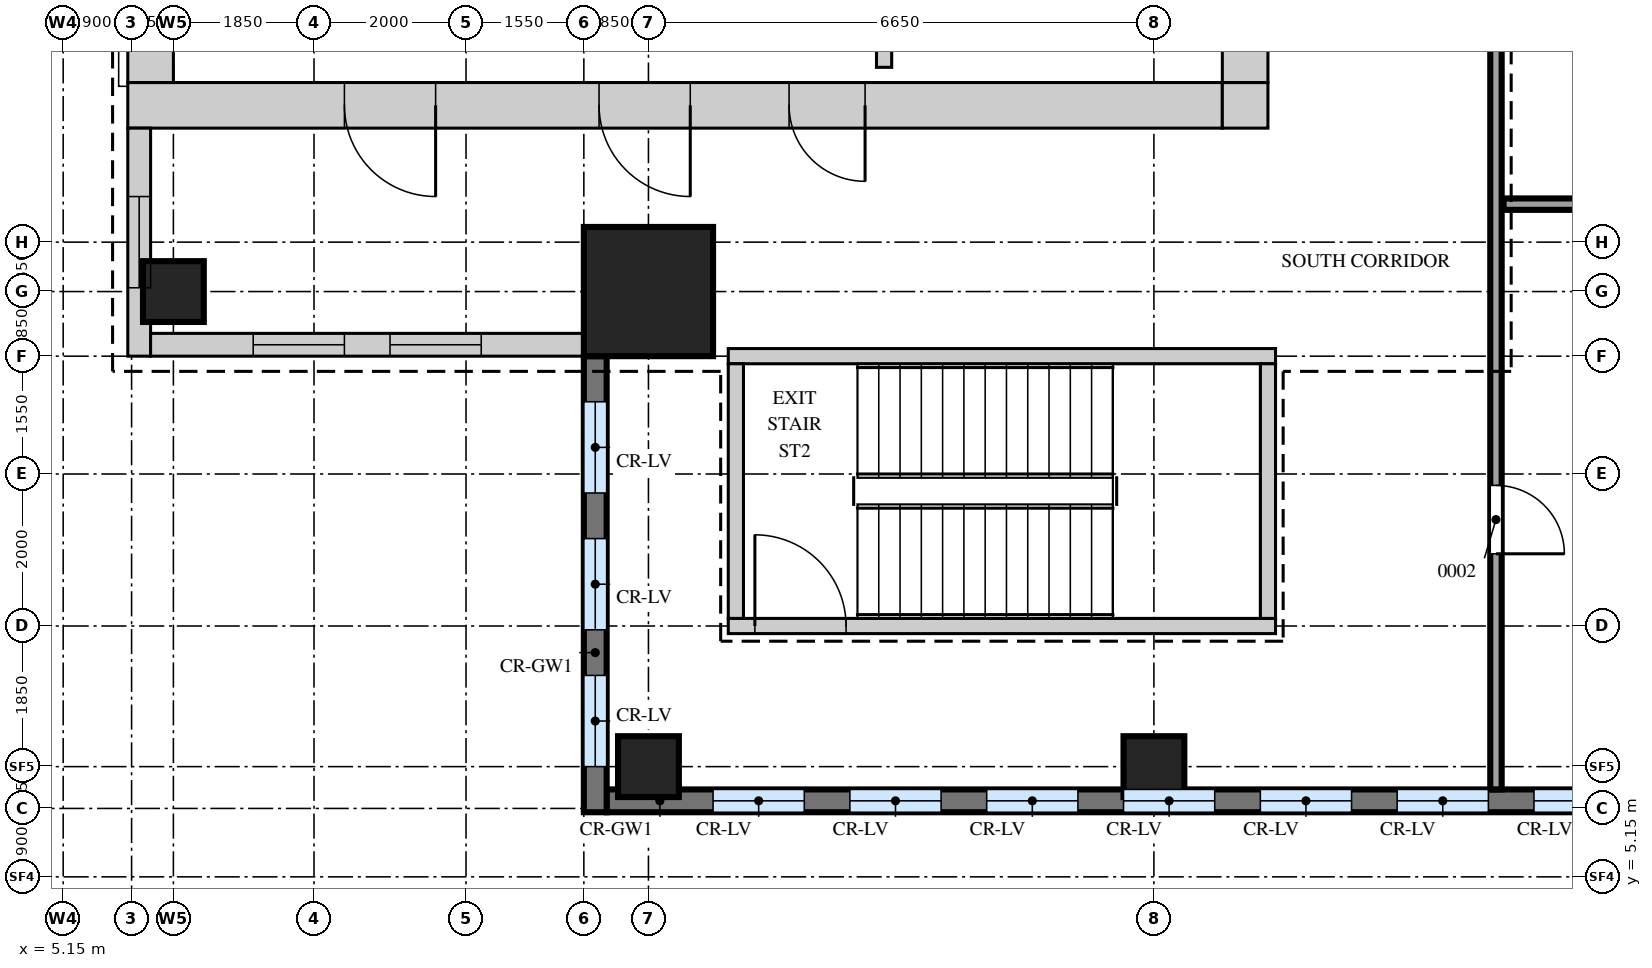
"""IFC4 building model, lengths in metres.
Left out: names, types, materials, properties, quantities, classifications, styles, units other than length and angle.
Written with IfcOpenShell. Run it as: python <this file> out.ifc"""

import sys

from ifc_helpers import new_model, si_unit, direction, frame, frame_2d, origin, origin_2d, place, context, subcontext, project, spatial, rectangle, extrude, source, transform, mapped, element, fill, save


model = new_model("IFC4")
c1 = context("Model", 3, precision=1e-05, world=origin(), true_north=direction((0.0, 1.0)))
c2 = subcontext(c1, "Body", "Model", "MODEL_VIEW")
j1 = project(units=[si_unit("LENGTHUNIT", "METRE"), si_unit("PLANEANGLEUNIT", "RADIAN")], contexts=[c1])
p1 = place(None, origin())
s1 = spatial("IfcSite", under=j1, at=p1, CompositionType="ELEMENT")
p2 = place(p1, origin())
s2 = spatial("IfcBuilding", under=s1, at=p2, CompositionType="ELEMENT")
p3 = place(p2, frame((0.0, 0.0, 339.2)))
s3 = spatial("IfcBuildingStorey", under=s2, at=p3, CompositionType="ELEMENT", Elevation=339.2)
m1 = source(origin(), c2, "Body", "SweptSolid", [
    extrude(rectangle(XDim=14.4, YDim=0.6, at=frame_2d((7.2, 0.0))), origin(), (0.0, 0.0, 1.0), 4.25),
])
p4 = place(p3, frame((6.0, 15.3, 0.0), z_axis=(0.0, 0.0, 1.0), x_axis=(1.0, 0.0, 0.0)))
e1 = element("IfcWall", 1, at=p4, inside=s3, PredefinedType="SHEAR", context=c2, shape_type="MappedRepresentation", body=[
    mapped(m1, transform((0.0, 0.0, 0.0))),
])
m2 = source(origin(), c2, "Body", "SweptSolid", [
    extrude(rectangle(XDim=1.2, YDim=2.1, at=frame_2d((0.6, 1.05))), frame((0.0, 0.31, 0.0), z_axis=(0.0, -1.0, 0.0), x_axis=(1.0, 0.0, 0.0)), (0.0, 0.0, 1.0), 0.62),
])
p5 = place(p4, frame((6.2, 0.0, 0.0)))
e2 = element("IfcOpeningElement", 2, at=p5, cuts=e1, PredefinedType="OPENING", context=c2, shape_type="MappedRepresentation", body=[
    mapped(m2, transform((0.0, 0.0, 0.0))),
])
p6 = place(p4, frame((2.85, 0.0, 0.0)))
e3 = element("IfcOpeningElement", 3, at=p6, cuts=e1, PredefinedType="OPENING", context=c2, shape_type="MappedRepresentation", body=[
    mapped(m2, transform((0.0, 0.0, 0.0))),
])
m3 = source(origin(), c2, "Body", "SweptSolid", [
    extrude(rectangle(XDim=1.0, YDim=2.1, at=frame_2d((0.5, 1.05))), frame((0.0, 0.31, 0.0), z_axis=(0.0, -1.0, 0.0), x_axis=(1.0, 0.0, 0.0)), (0.0, 0.0, 1.0), 0.62),
])
p7 = place(p4, frame((8.7, 0.0, 0.0)))
e4 = element("IfcOpeningElement", 4, at=p7, cuts=e1, PredefinedType="OPENING", context=c2, shape_type="MappedRepresentation", body=[
    mapped(m3, transform((0.0, 0.0, 0.0))),
])
m4 = source(origin(), c2, "Body", "SweptSolid", [
    extrude(rectangle(XDim=0.6, YDim=0.6, at=frame_2d((0.3, 0.0))), origin(), (0.0, 0.0, 1.0), 4.25),
])
p8 = place(p3, frame((20.4, 15.3, 0.0), z_axis=(0.0, 0.0, 1.0), x_axis=(1.0, 0.0, 0.0)))
e5 = element("IfcWall", 5, at=p8, inside=s3, PredefinedType="SHEAR", context=c2, shape_type="MappedRepresentation", body=[
    mapped(m4, transform((0.0, 0.0, 0.0))),
])
m5 = source(origin(), c2, "Body", "SweptSolid", [
    extrude(rectangle(XDim=22.8, YDim=0.6, at=frame_2d((11.4, 0.0))), origin(), (0.0, 0.0, 1.0), 4.25),
])
p9 = place(p3, frame((20.7, 15.6, 0.0), z_axis=(0.0, 0.0, 1.0), x_axis=(0.0, 1.0, 0.0)))
e6 = element("IfcWall", 6, at=p9, inside=s3, PredefinedType="SHEAR", context=c2, shape_type="MappedRepresentation", body=[
    mapped(m5, transform((0.0, 0.0, 0.0))),
])
m6 = source(origin(), c2, "Body", "SweptSolid", [
    extrude(rectangle(XDim=0.9, YDim=2.1, at=frame_2d((0.45, 1.05))), frame((0.0, 0.31, 0.0), z_axis=(0.0, -1.0, 0.0), x_axis=(1.0, 0.0, 0.0)), (0.0, 0.0, 1.0), 0.62),
])
p10 = place(p9, frame((8.2, 0.0, 0.0)))
e7 = element("IfcOpeningElement", 7, at=p10, cuts=e6, PredefinedType="OPENING", context=c2, shape_type="MappedRepresentation", body=[
    mapped(m6, transform((0.0, 0.0, 0.0))),
])
p11 = place(p9, frame((11.35, 0.0, 0.0)))
e8 = element("IfcOpeningElement", 8, at=p11, cuts=e6, PredefinedType="OPENING", context=c2, shape_type="MappedRepresentation", body=[
    mapped(m6, transform((0.0, 0.0, 0.0))),
])
p12 = place(p9, frame((14.65, 0.0, 0.0)))
e9 = element("IfcOpeningElement", 9, at=p12, cuts=e6, PredefinedType="OPENING", context=c2, shape_type="MappedRepresentation", body=[
    mapped(m6, transform((0.0, 0.0, 0.0))),
])
p13 = place(p9, frame((1.55, 0.0, 0.0)))
e10 = element("IfcOpeningElement", 10, at=p13, cuts=e6, PredefinedType="OPENING", context=c2, shape_type="MappedRepresentation", body=[
    mapped(m6, transform((0.0, 0.0, 0.0))),
])
p14 = place(p9, frame((5.1, 0.0, 0.0)))
e11 = element("IfcOpeningElement", 11, at=p14, cuts=e6, PredefinedType="OPENING", context=c2, shape_type="MappedRepresentation", body=[
    mapped(m6, transform((0.0, 0.0, 0.0))),
])
p15 = place(p3, frame((6.3, 15.6, 0.0), z_axis=(0.0, 0.0, 1.0), x_axis=(0.0, 1.0, 0.0)))
e12 = element("IfcWall", 12, at=p15, inside=s3, PredefinedType="SHEAR", context=c2, shape_type="MappedRepresentation", body=[
    mapped(m5, transform((0.0, 0.0, 0.0))),
])
m7 = source(origin(), c2, "Body", "SweptSolid", [
    extrude(rectangle(XDim=7.2, YDim=0.2, at=frame_2d((3.6, 0.0))), origin(), (0.0, 0.0, 1.0), 4.25),
])
p16 = place(p3, frame((13.9, 12.0, 0.0), z_axis=(0.0, 0.0, 1.0), x_axis=(1.0, 0.0, 0.0)))
e13 = element("IfcWall", 13, at=p16, inside=s3, PredefinedType="SHEAR", context=c2, shape_type="MappedRepresentation", body=[
    mapped(m7, transform((0.0, 0.0, 0.0))),
])
p17 = place(p3, frame((13.9, 8.45, 0.0), z_axis=(0.0, 0.0, 1.0), x_axis=(1.0, 0.0, 0.0)))
e14 = element("IfcWall", 14, at=p17, inside=s3, PredefinedType="SHEAR", context=c2, shape_type="MappedRepresentation", body=[
    mapped(m7, transform((0.0, 0.0, 0.0))),
])
m8 = source(origin(), c2, "Body", "SweptSolid", [
    extrude(rectangle(XDim=1.2, YDim=2.1, at=frame_2d((0.6, 1.05))), frame((0.0, 0.11, 0.0), z_axis=(0.0, -1.0, 0.0), x_axis=(1.0, 0.0, 0.0)), (0.0, 0.0, 1.0), 0.22),
])
p18 = place(p17, frame((0.35, 0.0, 0.0)))
e15 = element("IfcOpeningElement", 15, at=p18, cuts=e14, PredefinedType="OPENING", context=c2, shape_type="MappedRepresentation", body=[
    mapped(m8, transform((0.0, 0.0, 0.0))),
])
m9 = source(origin(), c2, "Body", "SweptSolid", [
    extrude(rectangle(XDim=3.35, YDim=0.2, at=frame_2d((1.675, 0.0))), origin(), (0.0, 0.0, 1.0), 4.25),
])
for number, where, z_axis, x_axis in (
    (16, (21.0, 8.55, 0.0), (0.0, 0.0, 1.0), (0.0, 1.0, 0.0)),
    (17, (14.0, 8.55, 0.0), (0.0, 0.0, 1.0), (0.0, 1.0, 0.0)),
):
    element("IfcWall", number, at=place(p3, frame(where, z_axis=z_axis, x_axis=x_axis)), inside=s3, PredefinedType="SHEAR", context=c2, shape_type="MappedRepresentation", body=[
        mapped(m9, transform((0.0, 0.0, 0.0))),
    ])
m10 = source(origin(), c2, "Body", "SweptSolid", [
    extrude(rectangle(XDim=1.7, YDim=1.7, at=origin_2d()), origin(), (0.0, 0.0, 1.0), 4.5),
])
p19 = place(p3, frame((12.85, 12.85, 0.0), z_axis=(0.0, 0.0, 1.0), x_axis=(1.0, 0.0, 0.0)))
e18 = element("IfcColumn", 18, at=p19, inside=s3, PredefinedType="COLUMN", context=c2, shape_type="MappedRepresentation", body=[
    mapped(m10, transform((0.0, 0.0, 0.0))),
])
m11 = source(origin(), c2, "Body", "SweptSolid", [
    extrude(rectangle(XDim=0.8, YDim=0.8, at=origin_2d()), origin(), (0.0, 0.0, 1.0), 4.5),
])
for number, where, z_axis, x_axis in (
    (19, (12.85, 6.6, 0.0), (0.0, 0.0, 1.0), (1.0, 0.0, 0.0)),
    (20, (19.5, 6.6, 0.0), (0.0, 0.0, 1.0), (1.0, 0.0, 0.0)),
    (21, (6.6, 12.85, 0.0), (0.0, 0.0, 1.0), (1.0, 0.0, 0.0)),
):
    element("IfcColumn", number, at=place(p3, frame(where, z_axis=z_axis, x_axis=x_axis)), inside=s3, PredefinedType="COLUMN", context=c2, shape_type="MappedRepresentation", body=[
        mapped(m11, transform((0.0, 0.0, 0.0))),
    ])
m12 = source(origin(), c2, "Body", "SweptSolid", [
    extrude(rectangle(XDim=18.362, YDim=0.3, at=frame_2d((9.181, 0.0))), origin(), (0.0, 0.0, 1.0), 4.5),
])
p20 = place(p3, frame((12.3, 6.15, 0.0), z_axis=(0.0, 0.0, 1.0), x_axis=(1.0, 0.0, 0.0)))
e22 = element("IfcWall", 22, at=p20, inside=s3, PredefinedType="SOLIDWALL", context=c2, shape_type="MappedRepresentation", body=[
    mapped(m12, transform((0.0, 0.0, 0.0))),
])
m13 = source(origin(), c2, "Body", "SweptSolid", [
    extrude(rectangle(XDim=1.2, YDim=2.4, at=frame_2d((0.6, 1.2))), frame((0.0, 0.16, 0.0), z_axis=(0.0, -1.0, 0.0), x_axis=(1.0, 0.0, 0.0)), (0.0, 0.0, 1.0), 0.32),
])
p21 = place(p20, frame((1.4, 0.0, 0.9)))
e23 = element("IfcOpeningElement", 23, at=p21, cuts=e22, PredefinedType="OPENING", context=c2, shape_type="MappedRepresentation", body=[
    mapped(m13, transform((0.0, 0.0, 0.0))),
])
p22 = place(p20, frame((3.2, 0.0, 0.9)))
e24 = element("IfcOpeningElement", 24, at=p22, cuts=e22, PredefinedType="OPENING", context=c2, shape_type="MappedRepresentation", body=[
    mapped(m13, transform((0.0, 0.0, 0.0))),
])
p23 = place(p20, frame((5.0, 0.0, 0.9)))
e25 = element("IfcOpeningElement", 25, at=p23, cuts=e22, PredefinedType="OPENING", context=c2, shape_type="MappedRepresentation", body=[
    mapped(m13, transform((0.0, 0.0, 0.0))),
])
p24 = place(p20, frame((6.8, 0.0, 0.9)))
e26 = element("IfcOpeningElement", 26, at=p24, cuts=e22, PredefinedType="OPENING", context=c2, shape_type="MappedRepresentation", body=[
    mapped(m13, transform((0.0, 0.0, 0.0))),
])
p25 = place(p20, frame((8.6, 0.0, 0.9)))
e27 = element("IfcOpeningElement", 27, at=p25, cuts=e22, PredefinedType="OPENING", context=c2, shape_type="MappedRepresentation", body=[
    mapped(m13, transform((0.0, 0.0, 0.0))),
])
p26 = place(p20, frame((10.4, 0.0, 0.9)))
e28 = element("IfcOpeningElement", 28, at=p26, cuts=e22, PredefinedType="OPENING", context=c2, shape_type="MappedRepresentation", body=[
    mapped(m13, transform((0.0, 0.0, 0.0))),
])
p27 = place(p20, frame((12.2, 0.0, 0.9)))
e29 = element("IfcOpeningElement", 29, at=p27, cuts=e22, PredefinedType="OPENING", context=c2, shape_type="MappedRepresentation", body=[
    mapped(m13, transform((0.0, 0.0, 0.0))),
])
p28 = place(p20, frame((14.0, 0.0, 0.9)))
e30 = element("IfcOpeningElement", 30, at=p28, cuts=e22, PredefinedType="OPENING", context=c2, shape_type="MappedRepresentation", body=[
    mapped(m13, transform((0.0, 0.0, 0.0))),
])
p29 = place(p20, frame((15.8, 0.0, 0.9)))
e31 = element("IfcOpeningElement", 31, at=p29, cuts=e22, PredefinedType="OPENING", context=c2, shape_type="MappedRepresentation", body=[
    mapped(m13, transform((0.0, 0.0, 0.0))),
])
m14 = source(origin(), c2, "Body", "SweptSolid", [
    extrude(rectangle(XDim=3.0, YDim=0.3, at=frame_2d((1.5, 0.0))), origin(), (0.0, 0.0, 1.0), 4.5),
])
p30 = place(p3, frame((6.15, 15.0, 0.0), z_axis=(0.0, 0.0, 1.0), x_axis=(0.0, -1.0, 0.0)))
e32 = element("IfcWall", 32, at=p30, inside=s3, PredefinedType="SOLIDWALL", context=c2, shape_type="MappedRepresentation", body=[
    mapped(m14, transform((0.0, 0.0, 0.0))),
])
p31 = place(p30, frame((0.9, 0.0, 0.9)))
e33 = element("IfcOpeningElement", 33, at=p31, cuts=e32, PredefinedType="OPENING", context=c2, shape_type="MappedRepresentation", body=[
    mapped(m13, transform((0.0, 0.0, 0.0))),
])
m15 = source(origin(), c2, "Body", "SweptSolid", [
    extrude(rectangle(XDim=5.7, YDim=0.3, at=frame_2d((2.85, 0.0))), origin(), (0.0, 0.0, 1.0), 4.5),
])
p32 = place(p3, frame((6.3, 12.15, 0.0), z_axis=(0.0, 0.0, 1.0), x_axis=(1.0, 0.0, 0.0)))
e34 = element("IfcWall", 34, at=p32, inside=s3, PredefinedType="SOLIDWALL", context=c2, shape_type="MappedRepresentation", body=[
    mapped(m15, transform((0.0, 0.0, 0.0))),
])
p33 = place(p32, frame((1.35, 0.0, 0.9)))
e35 = element("IfcOpeningElement", 35, at=p33, cuts=e34, PredefinedType="OPENING", context=c2, shape_type="MappedRepresentation", body=[
    mapped(m13, transform((0.0, 0.0, 0.0))),
])
p34 = place(p32, frame((3.15, 0.0, 0.9)))
e36 = element("IfcOpeningElement", 36, at=p34, cuts=e34, PredefinedType="OPENING", context=c2, shape_type="MappedRepresentation", body=[
    mapped(m13, transform((0.0, 0.0, 0.0))),
])
m16 = source(origin(), c2, "Body", "SweptSolid", [
    extrude(rectangle(XDim=6.0, YDim=0.3, at=frame_2d((3.0, 0.0))), origin(), (0.0, 0.0, 1.0), 4.5),
])
p35 = place(p3, frame((12.15, 12.0, 0.0), z_axis=(0.0, 0.0, 1.0), x_axis=(0.0, -1.0, 0.0)))
e37 = element("IfcWall", 37, at=p35, inside=s3, PredefinedType="SOLIDWALL", context=c2, shape_type="MappedRepresentation", body=[
    mapped(m16, transform((0.0, 0.0, 0.0))),
])
p36 = place(p35, frame((0.6, 0.0, 0.9)))
e38 = element("IfcOpeningElement", 38, at=p36, cuts=e37, PredefinedType="OPENING", context=c2, shape_type="MappedRepresentation", body=[
    mapped(m13, transform((0.0, 0.0, 0.0))),
])
p37 = place(p35, frame((2.4, 0.0, 0.9)))
e39 = element("IfcOpeningElement", 39, at=p37, cuts=e37, PredefinedType="OPENING", context=c2, shape_type="MappedRepresentation", body=[
    mapped(m13, transform((0.0, 0.0, 0.0))),
])
p38 = place(p35, frame((4.2, 0.0, 0.9)))
e40 = element("IfcOpeningElement", 40, at=p38, cuts=e37, PredefinedType="OPENING", context=c2, shape_type="MappedRepresentation", body=[
    mapped(m13, transform((0.0, 0.0, 0.0))),
])
m17 = source(origin(), c2, "Body", "SweptSolid", [
    extrude(rectangle(XDim=32.6, YDim=0.15, at=frame_2d((16.3, 0.0))), origin(), (0.0, 0.0, 1.0), 4.3),
])
p39 = place(p3, frame((24.0, 6.3, 0.0), z_axis=(0.0, 0.0, 1.0), x_axis=(0.0, 1.0, 0.0)))
e41 = element("IfcWall", 41, at=p39, inside=s3, PredefinedType="PARTITIONING", context=c2, shape_type="MappedRepresentation", body=[
    mapped(m17, transform((0.0, 0.0, 0.0))),
])
m18 = source(origin(), c2, "Body", "SweptSolid", [
    extrude(rectangle(XDim=0.9, YDim=2.1, at=frame_2d((0.45, 1.05))), frame((0.0, 0.085, 0.0), z_axis=(0.0, -1.0, 0.0), x_axis=(1.0, 0.0, 0.0)), (0.0, 0.0, 1.0), 0.17),
])
p40 = place(p39, frame((3.1, 0.0, 0.0)))
e42 = element("IfcOpeningElement", 42, at=p40, cuts=e41, PredefinedType="OPENING", context=c2, shape_type="MappedRepresentation", body=[
    mapped(m18, transform((0.0, 0.0, 0.0))),
])
p41 = place(p39, frame((12.6, 0.0, 0.0)))
e43 = element("IfcOpeningElement", 43, at=p41, cuts=e41, PredefinedType="OPENING", context=c2, shape_type="MappedRepresentation", body=[
    mapped(m18, transform((0.0, 0.0, 0.0))),
])
p42 = place(p39, frame((21.9, 0.0, 0.0)))
e44 = element("IfcOpeningElement", 44, at=p42, cuts=e41, PredefinedType="OPENING", context=c2, shape_type="MappedRepresentation", body=[
    mapped(m18, transform((0.0, 0.0, 0.0))),
])
m19 = source(origin(), c2, "Body", "SweptSolid", [
    extrude(rectangle(XDim=8.9, YDim=0.15, at=frame_2d((4.45, 0.0))), origin(), (0.0, 0.0, 1.0), 4.3),
])
p43 = place(p3, frame((24.1, 14.0, 0.0), z_axis=(0.0, 0.0, 1.0), x_axis=(1.0, 0.0, 0.0)))
e45 = element("IfcWall", 45, at=p43, inside=s3, PredefinedType="PARTITIONING", context=c2, shape_type="MappedRepresentation", body=[
    mapped(m19, transform((0.0, 0.0, 0.0))),
])
m20 = source(origin(), c2, "Body", "SweptSolid", [
    extrude(rectangle(XDim=3.4, YDim=0.2, at=frame_2d((1.7, 0.0))), origin(), (0.0, 0.0, 1.0), 4.3),
])
p44 = place(p3, frame((15.95, 15.8, 0.0), z_axis=(0.0, 0.0, 1.0), x_axis=(0.0, 1.0, 0.0)))
e46 = element("IfcWall", 46, at=p44, inside=s3, PredefinedType="PARTITIONING", context=c2, shape_type="MappedRepresentation", body=[
    mapped(m20, transform((0.0, 0.0, 0.0))),
])
m21 = source(origin(), c2, "Body", "SweptSolid", [
    extrude(rectangle(XDim=1.2, YDim=2.4, at=frame_2d((0.6, 1.2))), frame((0.0, 0.03, 0.0), z_axis=(0.0, -1.0, 0.0), x_axis=(1.0, 0.0, 0.0)), (0.0, 0.0, 1.0), 0.06),
])
p45 = place(p21, origin())
e47 = element("IfcWindow", 47, at=p45, inside=s3, PartitioningType="SINGLE_PANEL", PredefinedType="WINDOW", context=c2, shape_type="MappedRepresentation", body=[
    mapped(m21, transform((0.0, 0.0, 0.0))),
])
fill(e23, e47)
p46 = place(p22, origin())
e48 = element("IfcWindow", 48, at=p46, inside=s3, PartitioningType="SINGLE_PANEL", PredefinedType="WINDOW", context=c2, shape_type="MappedRepresentation", body=[
    mapped(m21, transform((0.0, 0.0, 0.0))),
])
fill(e24, e48)
p47 = place(p23, origin())
e49 = element("IfcWindow", 49, at=p47, inside=s3, PartitioningType="SINGLE_PANEL", PredefinedType="WINDOW", context=c2, shape_type="MappedRepresentation", body=[
    mapped(m21, transform((0.0, 0.0, 0.0))),
])
fill(e25, e49)
p48 = place(p24, origin())
e50 = element("IfcWindow", 50, at=p48, inside=s3, PartitioningType="SINGLE_PANEL", PredefinedType="WINDOW", context=c2, shape_type="MappedRepresentation", body=[
    mapped(m21, transform((0.0, 0.0, 0.0))),
])
fill(e26, e50)
p49 = place(p25, origin())
e51 = element("IfcWindow", 51, at=p49, inside=s3, PartitioningType="SINGLE_PANEL", PredefinedType="WINDOW", context=c2, shape_type="MappedRepresentation", body=[
    mapped(m21, transform((0.0, 0.0, 0.0))),
])
fill(e27, e51)
p50 = place(p26, origin())
e52 = element("IfcWindow", 52, at=p50, inside=s3, PartitioningType="SINGLE_PANEL", PredefinedType="WINDOW", context=c2, shape_type="MappedRepresentation", body=[
    mapped(m21, transform((0.0, 0.0, 0.0))),
])
fill(e28, e52)
p51 = place(p27, origin())
e53 = element("IfcWindow", 53, at=p51, inside=s3, PartitioningType="SINGLE_PANEL", PredefinedType="WINDOW", context=c2, shape_type="MappedRepresentation", body=[
    mapped(m21, transform((0.0, 0.0, 0.0))),
])
fill(e29, e53)
p52 = place(p31, origin())
e54 = element("IfcWindow", 54, at=p52, inside=s3, PartitioningType="SINGLE_PANEL", PredefinedType="WINDOW", context=c2, shape_type="MappedRepresentation", body=[
    mapped(m21, transform((0.0, 0.0, 0.0))),
])
fill(e33, e54)
p53 = place(p33, origin())
e55 = element("IfcWindow", 55, at=p53, inside=s3, PartitioningType="SINGLE_PANEL", PredefinedType="WINDOW", context=c2, shape_type="MappedRepresentation", body=[
    mapped(m21, transform((0.0, 0.0, 0.0))),
])
fill(e35, e55)
p54 = place(p34, origin())
e56 = element("IfcWindow", 56, at=p54, inside=s3, PartitioningType="SINGLE_PANEL", PredefinedType="WINDOW", context=c2, shape_type="MappedRepresentation", body=[
    mapped(m21, transform((0.0, 0.0, 0.0))),
])
fill(e36, e56)
p55 = place(p36, origin())
e57 = element("IfcWindow", 57, at=p55, inside=s3, PartitioningType="SINGLE_PANEL", PredefinedType="WINDOW", context=c2, shape_type="MappedRepresentation", body=[
    mapped(m21, transform((0.0, 0.0, 0.0))),
])
fill(e38, e57)
p56 = place(p37, origin())
e58 = element("IfcWindow", 58, at=p56, inside=s3, PartitioningType="SINGLE_PANEL", PredefinedType="WINDOW", context=c2, shape_type="MappedRepresentation", body=[
    mapped(m21, transform((0.0, 0.0, 0.0))),
])
fill(e39, e58)
p57 = place(p38, origin())
e59 = element("IfcWindow", 59, at=p57, inside=s3, PartitioningType="SINGLE_PANEL", PredefinedType="WINDOW", context=c2, shape_type="MappedRepresentation", body=[
    mapped(m21, transform((0.0, 0.0, 0.0))),
])
fill(e40, e59)
m22 = source(origin(), c2, "Body", "SweptSolid", [
    extrude(rectangle(XDim=0.9, YDim=2.1, at=frame_2d((0.45, 1.05))), frame((0.0, 0.025, 0.0), z_axis=(0.0, -1.0, 0.0), x_axis=(1.0, 0.0, 0.0)), (0.0, 0.0, 1.0), 0.05),
])
p58 = place(p40, origin())
e60 = element("IfcDoor", 60, at=p58, inside=s3, OperationType="SINGLE_SWING_LEFT", PredefinedType="DOOR", context=c2, shape_type="MappedRepresentation", body=[
    mapped(m22, transform((0.0, 0.0, 0.0))),
])
fill(e42, e60)
m23 = source(origin(), c2, "Body", "SweptSolid", [
    extrude(rectangle(XDim=1.2, YDim=2.1, at=frame_2d((0.6, 1.05))), frame((0.0, 0.25, 0.0), z_axis=(0.0, -1.0, 0.0), x_axis=(1.0, 0.0, 0.0)), (0.0, 0.0, 1.0), 0.5),
])
p59 = place(p5, origin())
e61 = element("IfcDoor", 61, at=p59, inside=s3, OperationType="SINGLE_SWING_RIGHT", PredefinedType="DOOR", context=c2, shape_type="MappedRepresentation", body=[
    mapped(m23, transform((0.0, 0.0, 0.0))),
])
fill(e2, e61)
p60 = place(p6, origin())
e62 = element("IfcDoor", 62, at=p60, inside=s3, OperationType="SINGLE_SWING_RIGHT", PredefinedType="DOOR", context=c2, shape_type="MappedRepresentation", body=[
    mapped(m23, transform((0.0, 0.0, 0.0))),
])
fill(e3, e62)
m24 = source(origin(), c2, "Body", "SweptSolid", [
    extrude(rectangle(XDim=1.0, YDim=2.1, at=frame_2d((0.5, 1.05))), frame((0.0, 0.25, 0.0), z_axis=(0.0, -1.0, 0.0), x_axis=(1.0, 0.0, 0.0)), (0.0, 0.0, 1.0), 0.5),
])
p61 = place(p7, origin())
e63 = element("IfcDoor", 63, at=p61, inside=s3, OperationType="SINGLE_SWING_RIGHT", PredefinedType="DOOR", context=c2, shape_type="MappedRepresentation", body=[
    mapped(m24, transform((0.0, 0.0, 0.0))),
])
fill(e4, e63)
m25 = source(origin(), c2, "Body", "SweptSolid", [
    extrude(rectangle(XDim=1.2, YDim=2.1, at=frame_2d((0.6, 1.05))), frame((0.0, 0.025, 0.0), z_axis=(0.0, -1.0, 0.0), x_axis=(1.0, 0.0, 0.0)), (0.0, 0.0, 1.0), 0.05),
])
p62 = place(p18, origin())
e64 = element("IfcDoor", 64, at=p62, inside=s3, OperationType="SINGLE_SWING_RIGHT", PredefinedType="DOOR", context=c2, shape_type="MappedRepresentation", body=[
    mapped(m25, transform((0.0, 0.0, 0.0))),
])
fill(e15, e64)
save(model, sys.argv[1])
